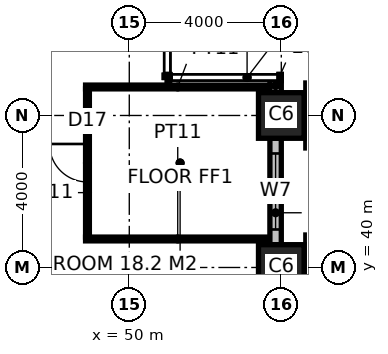
"""IFC4 building model, lengths in metres.
Left out: names, types, materials, properties, quantities, classifications, styles, units other than length and angle.
Written with IfcOpenShell. Run it as: python <this file> out.ifc"""

import sys

from ifc_helpers import new_model, si_unit, direction, frame, frame_2d, origin, origin_2d, place, context, subcontext, project, spatial, rectangle, hollow_rectangle, extrude, element, fill, save


model = new_model("IFC4")
c1 = context("Model", 3, precision=1e-05, world=origin(), true_north=direction((0.0, 1.0)))
c2 = subcontext(c1, "Body", "Model", "MODEL_VIEW")
j1 = project(units=[si_unit("LENGTHUNIT", "METRE"), si_unit("PLANEANGLEUNIT", "RADIAN")], contexts=[c1])
p1 = place(None, origin())
s1 = spatial("IfcSite", under=j1, at=p1, CompositionType="ELEMENT")
p2 = place(p1, origin())
s2 = spatial("IfcBuilding", under=s1, at=p2, CompositionType="ELEMENT")
p3 = place(p2, frame((0.0, 0.0, 67.0)))
s3 = spatial("IfcBuildingStorey", under=s2, at=p3, CompositionType="ELEMENT", Elevation=67.0)
for number, where, z_axis, x_axis in (
    (1, (54.0, 40.0, 0.0), (0.0, 0.0, 1.0), (1.0, 0.0, 0.0)),
    (2, (54.0, 44.0, 0.0), (0.0, 0.0, 1.0), (1.0, 0.0, 0.0)),
):
    element("IfcColumn", number, at=place(p3, frame(where, z_axis=z_axis, x_axis=x_axis)), inside=s3, PredefinedType="COLUMN", context=c2, shape_type="SweptSolid", body=[
        extrude(hollow_rectangle(XDim=1.2, YDim=1.2, WallThickness=0.125, at=origin_2d()), origin(), (0.0, 0.0, 1.0), 4.0),
    ])
for number, where, z_axis, x_axis in (
    (3, (48.85, 40.75, 0.0), (0.0, 0.0, 1.0), (1.0, 0.0, 0.0)),
    (4, (48.85, 44.75, 0.0), (0.0, 0.0, 1.0), (1.0, 0.0, 0.0)),
):
    element("IfcWall", number, at=place(p3, frame(where, z_axis=z_axis, x_axis=x_axis)), inside=s3, PredefinedType="PARTITIONING", context=c2, shape_type="SweptSolid", body=[
        extrude(rectangle(XDim=4.85, YDim=0.1, at=frame_2d((2.425, 0.0))), origin(), (0.0, 0.0, 1.0), 3.85),
    ])
p4 = place(p3, frame((48.9, 40.8, 0.0), z_axis=(0.0, 0.0, 1.0), x_axis=(0.0, 1.0, 0.0)))
e5 = element("IfcWall", 5, at=p4, inside=s3, PredefinedType="PARTITIONING", context=c2, shape_type="SweptSolid", body=[
    extrude(rectangle(XDim=3.9, YDim=0.1, at=frame_2d((1.95, 0.0))), origin(), (0.0, 0.0, 1.0), 3.85),
])
p5 = place(p4, frame((1.45, 0.0, 0.0)))
e6 = element("IfcOpeningElement", 6, at=p5, cuts=e5, PredefinedType="OPENING", context=c2, shape_type="SweptSolid", body=[
    extrude(rectangle(XDim=1.0, YDim=2.2, at=frame_2d((0.5, 1.1))), frame((0.0, 0.06, 0.0), z_axis=(0.0, -1.0, 0.0), x_axis=(1.0, 0.0, 0.0)), (0.0, 0.0, 1.0), 0.12),
])
p6 = place(p3, frame((53.85, 40.6, 0.0), z_axis=(0.0, 0.0, 1.0), x_axis=(0.0, 1.0, 0.0)))
e7 = element("IfcWall", 7, at=p6, inside=s3, PredefinedType="ELEMENTEDWALL", context=c2, shape_type="SweptSolid", body=[
    extrude(rectangle(XDim=2.8, YDim=0.3, at=frame_2d((1.4, 0.0))), origin(), (0.0, 0.0, 1.0), 2.65),
])
p7 = place(p6, frame((0.4, 0.0, 0.8)))
e8 = element("IfcOpeningElement", 8, at=p7, cuts=e7, PredefinedType="OPENING", context=c2, shape_type="SweptSolid", body=[
    extrude(rectangle(XDim=2.0, YDim=1.8, at=frame_2d((1.0, 0.9))), frame((0.0, 0.16, 0.0), z_axis=(0.0, -1.0, 0.0), x_axis=(1.0, 0.0, 0.0)), (0.0, 0.0, 1.0), 0.32),
])
p8 = place(p3, frame((53.85, 44.6, 0.0), z_axis=(0.0, 0.0, 1.0), x_axis=(0.0, 1.0, 0.0)))
e9 = element("IfcWall", 9, at=p8, inside=s3, PredefinedType="ELEMENTEDWALL", context=c2, shape_type="SweptSolid", body=[
    extrude(rectangle(XDim=0.37, YDim=0.3, at=frame_2d((0.185, 0.0))), origin(), (0.0, 0.0, 1.0), 2.65),
])
p9 = place(p5, origin())
e10 = element("IfcDoor", 10, at=p9, inside=s3, OperationType="SINGLE_SWING_RIGHT", PredefinedType="DOOR", context=c2, shape_type="SweptSolid", body=[
    extrude(rectangle(XDim=1.0, YDim=2.2, at=frame_2d((0.5, 1.1))), frame((0.0, 0.025, 0.0), z_axis=(0.0, -1.0, 0.0), x_axis=(1.0, 0.0, 0.0)), (0.0, 0.0, 1.0), 0.05),
])
fill(e6, e10)
p10 = place(p7, origin())
e11 = element("IfcWindow", 11, at=p10, inside=s3, PartitioningType="SINGLE_PANEL", PredefinedType="WINDOW", context=c2, shape_type="SweptSolid", body=[
    extrude(rectangle(XDim=2.0, YDim=1.8, at=frame_2d((1.0, 0.9))), frame((0.0, 0.03, 0.0), z_axis=(0.0, -1.0, 0.0), x_axis=(1.0, 0.0, 0.0)), (0.0, 0.0, 1.0), 0.06),
])
fill(e8, e11)
save(model, sys.argv[1])
